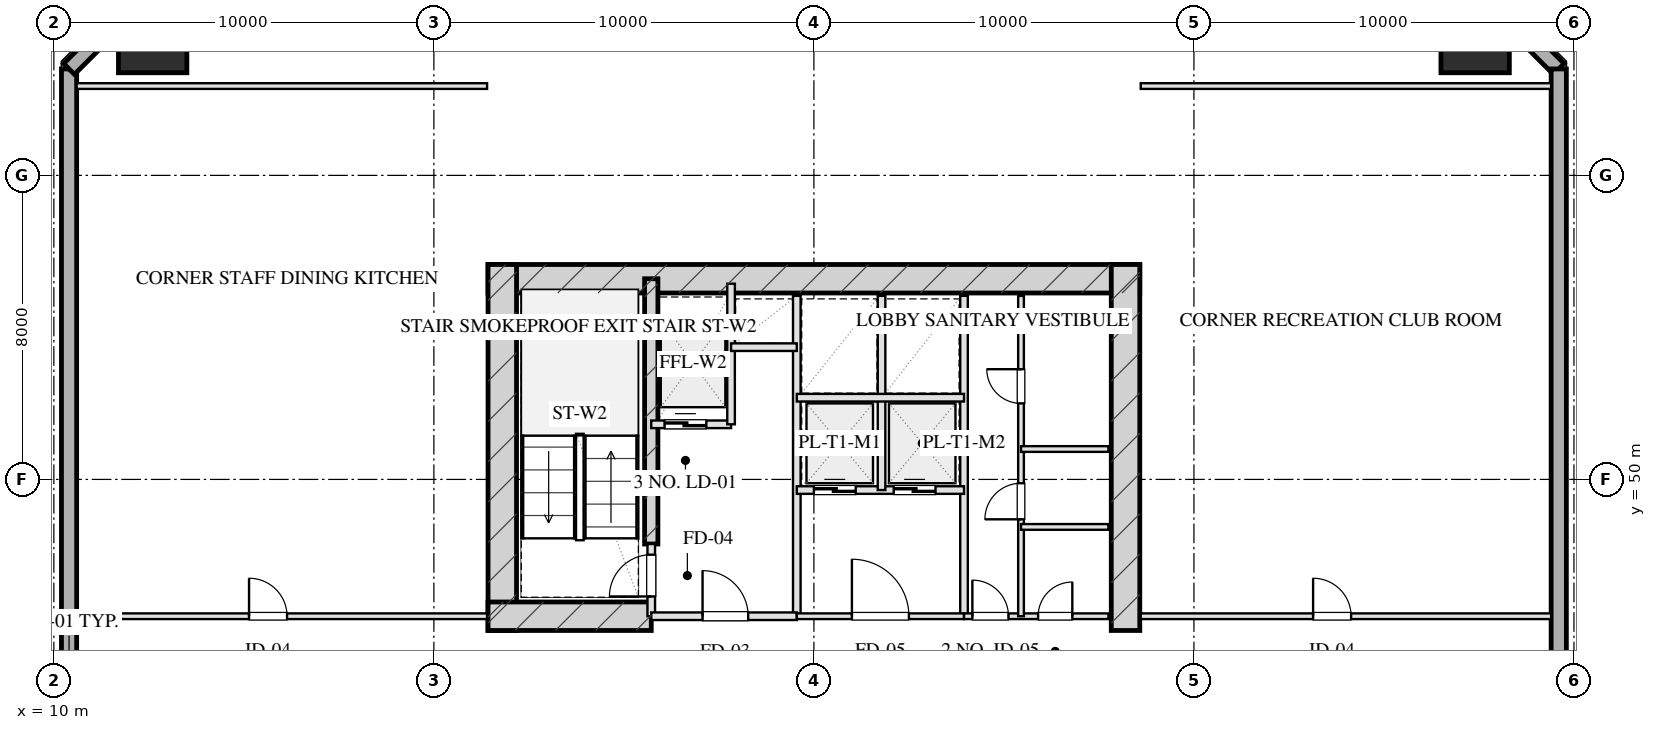
"""IFC4 building model, lengths in metres.
Left out: names, types, materials, properties, quantities, classifications, styles, units other than length and angle.
Written with IfcOpenShell. Run it as: python <this file> out.ifc"""

import sys

from ifc_helpers import new_model, si_unit, direction, frame, frame_2d, origin, origin_2d, place, context, subcontext, project, spatial, rectangle, hollow_rectangle, extrude, element, fill, save


model = new_model("IFC4")
c1 = context("Model", 3, precision=1e-05, world=origin(), true_north=direction((0.0, 1.0)))
c2 = subcontext(c1, "Body", "Model", "MODEL_VIEW")
j1 = project(units=[si_unit("LENGTHUNIT", "METRE"), si_unit("PLANEANGLEUNIT", "RADIAN")], contexts=[c1])
p1 = place(None, origin())
s1 = spatial("IfcSite", under=j1, at=p1, CompositionType="ELEMENT")
p2 = place(p1, origin())
s2 = spatial("IfcBuilding", under=s1, at=p2, CompositionType="ELEMENT")
p3 = place(p2, frame((0.0, 0.0, 67.85)))
s3 = spatial("IfcBuildingStorey", under=s2, at=p3, CompositionType="ELEMENT", Elevation=67.85)
p4 = place(p3, frame((21.425, 55.28, 0.0), z_axis=(0.0, 0.0, 1.0), x_axis=(1.0, 0.0, 0.0)))
e1 = element("IfcWall", 1, at=p4, inside=s3, PredefinedType="SHEAR", context=c2, shape_type="SweptSolid", body=[
    extrude(rectangle(XDim=17.15, YDim=0.75, at=frame_2d((8.575, 0.0))), origin(), (0.0, 0.0, 1.0), 3.45),
])
for number, where, z_axis, x_axis in (
    (2, (21.8, 46.025, 0.0), (0.0, 0.0, 1.0), (0.0, 1.0, 0.0)),
    (3, (38.2, 46.025, 0.0), (0.0, 0.0, 1.0), (0.0, 1.0, 0.0)),
):
    element("IfcWall", number, at=place(p3, frame(where, z_axis=z_axis, x_axis=x_axis)), inside=s3, PredefinedType="SHEAR", context=c2, shape_type="SweptSolid", body=[
        extrude(rectangle(XDim=9.63, YDim=0.75, at=frame_2d((4.815, 0.0))), origin(), (0.0, 0.0, 1.0), 3.45),
    ])
p5 = place(p3, frame((25.72, 48.3, 0.0), z_axis=(0.0, 0.0, 1.0), x_axis=(0.0, 1.0, 0.0)))
e4 = element("IfcWall", 4, at=p5, inside=s3, PredefinedType="SHEAR", context=c2, shape_type="SweptSolid", body=[
    extrude(rectangle(XDim=6.98, YDim=0.35, at=frame_2d((3.49, 0.0))), origin(), (0.0, 0.0, 1.0), 3.45),
])
p6 = place(p3, frame((21.425, 46.4, 0.0), z_axis=(0.0, 0.0, 1.0), x_axis=(1.0, 0.0, 0.0)))
e5 = element("IfcWall", 5, at=p6, inside=s3, PredefinedType="SHEAR", context=c2, shape_type="SweptSolid", body=[
    extrude(rectangle(XDim=4.295, YDim=0.75, at=frame_2d((2.147, 0.0))), origin(), (0.0, 0.0, 1.0), 3.45),
])
for number, where, z_axis, x_axis in (
    (6, (47.4, 61.6, 0.0), (0.0, 0.0, 1.0), (1.0, 0.0, 0.0)),
    (7, (12.6, 61.6, 0.0), (0.0, 0.0, 1.0), (1.0, 0.0, 0.0)),
):
    element("IfcColumn", number, at=place(p3, frame(where, z_axis=z_axis, x_axis=x_axis)), inside=s3, PredefinedType="COLUMN", context=c2, shape_type="SweptSolid", body=[
        extrude(hollow_rectangle(XDim=1.8, YDim=1.8, WallThickness=0.06, at=origin_2d()), origin(), (0.0, 0.0, 1.0), 3.451),
    ])
p7 = place(p3, frame((10.4, 7.2, 0.0), z_axis=(0.0, 0.0, 1.0), x_axis=(0.0, 1.0, 0.0)))
e8 = element("IfcWall", 8, at=p7, inside=s3, PredefinedType="SOLIDWALL", context=c2, shape_type="SweptSolid", body=[
    extrude(rectangle(XDim=53.6, YDim=0.4, at=frame_2d((26.8, 0.0))), origin(), (0.0, 0.0, 1.0), 2.61),
])
p8 = place(p7, frame((31.95, 0.0, 0.75)))
e9 = element("IfcOpeningElement", 9, at=p8, cuts=e8, PredefinedType="OPENING", context=c2, shape_type="SweptSolid", body=[
    extrude(rectangle(XDim=2.5, YDim=1.46, at=frame_2d((1.25, 0.73))), frame((0.0, 0.21, 0.0), z_axis=(0.0, -1.0, 0.0), x_axis=(1.0, 0.0, 0.0)), (0.0, 0.0, 1.0), 0.42),
])
p9 = place(p7, frame((20.45, 0.0, 0.0)))
e10 = element("IfcOpeningElement", 10, at=p9, cuts=e8, PredefinedType="OPENING", context=c2, shape_type="SweptSolid", body=[
    extrude(rectangle(XDim=1.1, YDim=2.15, at=frame_2d((0.55, 1.075))), frame((0.0, 0.21, 0.0), z_axis=(0.0, -1.0, 0.0), x_axis=(1.0, 0.0, 0.0)), (0.0, 0.0, 1.0), 0.42),
])
for number, where, z_axis, x_axis in (
    (11, (10.4, 60.8, 0.0), (0.0, 0.0, 1.0), (0.707, 0.707, 0.0)),
    (12, (46.6, 63.8, 0.0), (0.0, 0.0, 1.0), (0.707, -0.707, 0.0)),
):
    element("IfcWall", number, at=place(p3, frame(where, z_axis=z_axis, x_axis=x_axis)), inside=s3, PredefinedType="SOLIDWALL", context=c2, shape_type="SweptSolid", body=[
        extrude(rectangle(XDim=4.243, YDim=0.4, at=frame_2d((2.121, 0.0))), origin(), (0.0, 0.0, 1.0), 2.61),
    ])
p10 = place(p3, frame((49.6, 60.8, 0.0), z_axis=(0.0, 0.0, 1.0), x_axis=(0.0, -1.0, 0.0)))
e13 = element("IfcWall", 13, at=p10, inside=s3, PredefinedType="SOLIDWALL", context=c2, shape_type="SweptSolid", body=[
    extrude(rectangle(XDim=53.6, YDim=0.4, at=frame_2d((26.8, 0.0))), origin(), (0.0, 0.0, 1.0), 2.61),
])
p11 = place(p10, frame((22.95, 0.0, 0.75)))
e14 = element("IfcOpeningElement", 14, at=p11, cuts=e13, PredefinedType="OPENING", context=c2, shape_type="SweptSolid", body=[
    extrude(rectangle(XDim=2.5, YDim=1.46, at=frame_2d((1.25, 0.73))), frame((0.0, 0.21, 0.0), z_axis=(0.0, -1.0, 0.0), x_axis=(1.0, 0.0, 0.0)), (0.0, 0.0, 1.0), 0.42),
])
p12 = place(p10, frame((29.35, 0.0, 0.0)))
e15 = element("IfcOpeningElement", 15, at=p12, cuts=e13, PredefinedType="OPENING", context=c2, shape_type="SweptSolid", body=[
    extrude(rectangle(XDim=1.1, YDim=2.15, at=frame_2d((0.55, 1.075))), frame((0.0, 0.21, 0.0), z_axis=(0.0, -1.0, 0.0), x_axis=(1.0, 0.0, 0.0)), (0.0, 0.0, 1.0), 0.42),
])
p13 = place(p3, frame((25.72, 46.4, 0.0), z_axis=(0.0, 0.0, 1.0), x_axis=(0.0, 1.0, 0.0)))
e16 = element("IfcWall", 16, at=p13, inside=s3, PredefinedType="PARTITIONING", context=c2, shape_type="SweptSolid", body=[
    extrude(rectangle(XDim=1.9, YDim=0.2, at=frame_2d((0.95, 0.0))), origin(), (0.0, 0.0, 1.0), 3.175),
])
p14 = place(p13, frame((0.52, 0.0, 0.0)))
e17 = element("IfcOpeningElement", 17, at=p14, cuts=e16, PredefinedType="OPENING", context=c2, shape_type="SweptSolid", body=[
    extrude(rectangle(XDim=1.1, YDim=2.05, at=frame_2d((0.55, 1.025))), frame((0.0, 0.11, 0.0), z_axis=(0.0, -1.0, 0.0), x_axis=(1.0, 0.0, 0.0)), (0.0, 0.0, 1.0), 0.22),
])
p15 = place(p3, frame((29.55, 46.4, 0.0), z_axis=(0.0, 0.0, 1.0), x_axis=(0.0, 1.0, 0.0)))
e18 = element("IfcWall", 18, at=p15, inside=s3, PredefinedType="PARTITIONING", context=c2, shape_type="SweptSolid", body=[
    extrude(rectangle(XDim=8.43, YDim=0.2, at=frame_2d((4.215, 0.0))), origin(), (0.0, 0.0, 1.0), 3.175),
])
p16 = place(p3, frame((25.72, 46.4, 0.0), z_axis=(0.0, 0.0, 1.0), x_axis=(1.0, 0.0, 0.0)))
e19 = element("IfcWall", 19, at=p16, inside=s3, PredefinedType="PARTITIONING", context=c2, shape_type="SweptSolid", body=[
    extrude(rectangle(XDim=3.83, YDim=0.2, at=frame_2d((1.915, 0.0))), origin(), (0.0, 0.0, 1.0), 3.175),
])
p17 = place(p16, frame((1.35, 0.0, 0.0)))
e20 = element("IfcOpeningElement", 20, at=p17, cuts=e19, PredefinedType="OPENING", context=c2, shape_type="SweptSolid", body=[
    extrude(rectangle(XDim=1.2, YDim=2.05, at=frame_2d((0.6, 1.025))), frame((0.0, 0.11, 0.0), z_axis=(0.0, -1.0, 0.0), x_axis=(1.0, 0.0, 0.0)), (0.0, 0.0, 1.0), 0.22),
])
p18 = place(p3, frame((25.72, 51.45, 0.0), z_axis=(0.0, 0.0, 1.0), x_axis=(1.0, 0.0, 0.0)))
e21 = element("IfcWall", 21, at=p18, inside=s3, PredefinedType="PARTITIONING", context=c2, shape_type="SweptSolid", body=[
    extrude(rectangle(XDim=2.1, YDim=0.2, at=frame_2d((1.05, 0.0))), origin(), (0.0, 0.0, 1.0), 3.175),
])
p19 = place(p18, frame((0.35, 0.0, 0.0)))
e22 = element("IfcOpeningElement", 22, at=p19, cuts=e21, PredefinedType="OPENING", context=c2, shape_type="SweptSolid", body=[
    extrude(rectangle(XDim=1.1, YDim=2.05, at=frame_2d((0.55, 1.025))), frame((0.0, 0.11, 0.0), z_axis=(0.0, -1.0, 0.0), x_axis=(1.0, 0.0, 0.0)), (0.0, 0.0, 1.0), 0.22),
])
p20 = place(p3, frame((27.82, 51.45, 0.0), z_axis=(0.0, 0.0, 1.0), x_axis=(0.0, 1.0, 0.0)))
e23 = element("IfcWall", 23, at=p20, inside=s3, PredefinedType="PARTITIONING", context=c2, shape_type="SweptSolid", body=[
    extrude(rectangle(XDim=3.7, YDim=0.2, at=frame_2d((1.85, 0.0))), origin(), (0.0, 0.0, 1.0), 3.175),
])
p21 = place(p3, frame((27.82, 53.48, 0.0), z_axis=(0.0, 0.0, 1.0), x_axis=(1.0, 0.0, 0.0)))
e24 = element("IfcWall", 24, at=p21, inside=s3, PredefinedType="PARTITIONING", context=c2, shape_type="SweptSolid", body=[
    extrude(rectangle(XDim=1.73, YDim=0.2, at=frame_2d((0.865, 0.0))), origin(), (0.0, 0.0, 1.0), 3.175),
])
p22 = place(p3, frame((33.95, 46.4, 0.0), z_axis=(0.0, 0.0, 1.0), x_axis=(0.0, 1.0, 0.0)))
e25 = element("IfcWall", 25, at=p22, inside=s3, PredefinedType="PARTITIONING", context=c2, shape_type="SweptSolid", body=[
    extrude(rectangle(XDim=8.43, YDim=0.2, at=frame_2d((4.215, 0.0))), origin(), (0.0, 0.0, 1.0), 3.175),
])
p23 = place(p3, frame((29.55, 46.4, 0.0), z_axis=(0.0, 0.0, 1.0), x_axis=(1.0, 0.0, 0.0)))
e26 = element("IfcWall", 26, at=p23, inside=s3, PredefinedType="PARTITIONING", context=c2, shape_type="SweptSolid", body=[
    extrude(rectangle(XDim=4.4, YDim=0.15, at=frame_2d((2.2, 0.0))), origin(), (0.0, 0.0, 1.0), 3.175),
])
p24 = place(p23, frame((1.45, 0.0, 0.0)))
e27 = element("IfcOpeningElement", 27, at=p24, cuts=e26, PredefinedType="OPENING", context=c2, shape_type="SweptSolid", body=[
    extrude(rectangle(XDim=1.5, YDim=2.05, at=frame_2d((0.75, 1.025))), frame((0.0, 0.085, 0.0), z_axis=(0.0, -1.0, 0.0), x_axis=(1.0, 0.0, 0.0)), (0.0, 0.0, 1.0), 0.17),
])
p25 = place(p3, frame((29.55, 49.72, 0.0), z_axis=(0.0, 0.0, 1.0), x_axis=(1.0, 0.0, 0.0)))
e28 = element("IfcWall", 28, at=p25, inside=s3, PredefinedType="PARTITIONING", context=c2, shape_type="SweptSolid", body=[
    extrude(rectangle(XDim=4.4, YDim=0.2, at=frame_2d((2.2, 0.0))), origin(), (0.0, 0.0, 1.0), 3.175),
])
p26 = place(p25, frame((0.45, 0.0, 0.0)))
e29 = element("IfcOpeningElement", 29, at=p26, cuts=e28, PredefinedType="OPENING", context=c2, shape_type="SweptSolid", body=[
    extrude(rectangle(XDim=1.1, YDim=2.05, at=frame_2d((0.55, 1.025))), frame((0.0, 0.11, 0.0), z_axis=(0.0, -1.0, 0.0), x_axis=(1.0, 0.0, 0.0)), (0.0, 0.0, 1.0), 0.22),
])
p27 = place(p25, frame((2.55, 0.0, 0.0)))
e30 = element("IfcOpeningElement", 30, at=p27, cuts=e28, PredefinedType="OPENING", context=c2, shape_type="SweptSolid", body=[
    extrude(rectangle(XDim=1.1, YDim=2.05, at=frame_2d((0.55, 1.025))), frame((0.0, 0.11, 0.0), z_axis=(0.0, -1.0, 0.0), x_axis=(1.0, 0.0, 0.0)), (0.0, 0.0, 1.0), 0.22),
])
p28 = place(p3, frame((31.78, 49.72, 0.0), z_axis=(0.0, 0.0, 1.0), x_axis=(0.0, 1.0, 0.0)))
e31 = element("IfcWall", 31, at=p28, inside=s3, PredefinedType="PARTITIONING", context=c2, shape_type="SweptSolid", body=[
    extrude(rectangle(XDim=5.11, YDim=0.2, at=frame_2d((2.555, 0.0))), origin(), (0.0, 0.0, 1.0), 3.175),
])
p29 = place(p3, frame((29.55, 52.15, 0.0), z_axis=(0.0, 0.0, 1.0), x_axis=(1.0, 0.0, 0.0)))
e32 = element("IfcWall", 32, at=p29, inside=s3, PredefinedType="PARTITIONING", context=c2, shape_type="SweptSolid", body=[
    extrude(rectangle(XDim=4.4, YDim=0.2, at=frame_2d((2.2, 0.0))), origin(), (0.0, 0.0, 1.0), 3.175),
])
p30 = place(p3, frame((33.95, 46.4, 0.0), z_axis=(0.0, 0.0, 1.0), x_axis=(1.0, 0.0, 0.0)))
e33 = element("IfcWall", 33, at=p30, inside=s3, PredefinedType="PARTITIONING", context=c2, shape_type="SweptSolid", body=[
    extrude(rectangle(XDim=3.8, YDim=0.15, at=frame_2d((1.9, 0.0))), origin(), (0.0, 0.0, 1.0), 3.175),
])
p31 = place(p30, frame((0.22, 0.0, 0.0)))
e34 = element("IfcOpeningElement", 34, at=p31, cuts=e33, PredefinedType="OPENING", context=c2, shape_type="SweptSolid", body=[
    extrude(rectangle(XDim=0.95, YDim=2.05, at=frame_2d((0.475, 1.025))), frame((0.0, 0.085, 0.0), z_axis=(0.0, -1.0, 0.0), x_axis=(1.0, 0.0, 0.0)), (0.0, 0.0, 1.0), 0.17),
])
p32 = place(p30, frame((1.95, 0.0, 0.0)))
e35 = element("IfcOpeningElement", 35, at=p32, cuts=e33, PredefinedType="OPENING", context=c2, shape_type="SweptSolid", body=[
    extrude(rectangle(XDim=0.9, YDim=2.05, at=frame_2d((0.45, 1.025))), frame((0.0, 0.085, 0.0), z_axis=(0.0, -1.0, 0.0), x_axis=(1.0, 0.0, 0.0)), (0.0, 0.0, 1.0), 0.17),
])
p33 = place(p3, frame((35.45, 46.4, 0.0), z_axis=(0.0, 0.0, 1.0), x_axis=(0.0, 1.0, 0.0)))
e36 = element("IfcWall", 36, at=p33, inside=s3, PredefinedType="PARTITIONING", context=c2, shape_type="SweptSolid", body=[
    extrude(rectangle(XDim=8.43, YDim=0.15, at=frame_2d((4.215, 0.0))), origin(), (0.0, 0.0, 1.0), 2.765),
])
p34 = place(p33, frame((2.55, 0.0, 0.0)))
e37 = element("IfcOpeningElement", 37, at=p34, cuts=e36, PredefinedType="OPENING", context=c2, shape_type="SweptSolid", body=[
    extrude(rectangle(XDim=0.95, YDim=2.05, at=frame_2d((0.475, 1.025))), frame((0.0, 0.085, 0.0), z_axis=(0.0, -1.0, 0.0), x_axis=(1.0, 0.0, 0.0)), (0.0, 0.0, 1.0), 0.17),
])
p35 = place(p33, frame((5.6, 0.0, 0.0)))
e38 = element("IfcOpeningElement", 38, at=p35, cuts=e36, PredefinedType="OPENING", context=c2, shape_type="SweptSolid", body=[
    extrude(rectangle(XDim=0.9, YDim=2.05, at=frame_2d((0.45, 1.025))), frame((0.0, 0.085, 0.0), z_axis=(0.0, -1.0, 0.0), x_axis=(1.0, 0.0, 0.0)), (0.0, 0.0, 1.0), 0.17),
])
for number, where, z_axis, x_axis in (
    (39, (35.45, 50.8, 0.0), (0.0, 0.0, 1.0), (1.0, 0.0, 0.0)),
    (40, (35.45, 48.75, 0.0), (0.0, 0.0, 1.0), (1.0, 0.0, 0.0)),
):
    element("IfcWall", number, at=place(p3, frame(where, z_axis=z_axis, x_axis=x_axis)), inside=s3, PredefinedType="PARTITIONING", context=c2, shape_type="SweptSolid", body=[
        extrude(rectangle(XDim=2.3, YDim=0.15, at=frame_2d((1.15, 0.0))), origin(), (0.0, 0.0, 1.0), 3.175),
    ])
p36 = place(p3, frame((10.6, 60.35, 0.0), z_axis=(0.0, 0.0, 1.0), x_axis=(1.0, 0.0, 0.0)))
e41 = element("IfcWall", 41, at=p36, inside=s3, PredefinedType="PARTITIONING", context=c2, shape_type="SweptSolid", body=[
    extrude(rectangle(XDim=10.8, YDim=0.15, at=frame_2d((5.4, 0.0))), origin(), (0.0, 0.0, 1.0), 3.175),
])
p37 = place(p3, frame((10.6, 46.4, 0.0), z_axis=(0.0, 0.0, 1.0), x_axis=(1.0, 0.0, 0.0)))
e42 = element("IfcWall", 42, at=p37, inside=s3, PredefinedType="PARTITIONING", context=c2, shape_type="SweptSolid", body=[
    extrude(rectangle(XDim=10.8, YDim=0.15, at=frame_2d((5.4, 0.0))), origin(), (0.0, 0.0, 1.0), 3.175),
])
p38 = place(p37, frame((4.536, 0.0, 0.0)))
e43 = element("IfcOpeningElement", 43, at=p38, cuts=e42, PredefinedType="OPENING", context=c2, shape_type="SweptSolid", body=[
    extrude(rectangle(XDim=1.0, YDim=2.05, at=frame_2d((0.5, 1.025))), frame((0.0, 0.085, 0.0), z_axis=(0.0, -1.0, 0.0), x_axis=(1.0, 0.0, 0.0)), (0.0, 0.0, 1.0), 0.17),
])
p39 = place(p3, frame((38.6, 60.35, 0.0), z_axis=(0.0, 0.0, 1.0), x_axis=(1.0, 0.0, 0.0)))
e44 = element("IfcWall", 44, at=p39, inside=s3, PredefinedType="PARTITIONING", context=c2, shape_type="SweptSolid", body=[
    extrude(rectangle(XDim=10.8, YDim=0.15, at=frame_2d((5.4, 0.0))), origin(), (0.0, 0.0, 1.0), 3.175),
])
p40 = place(p3, frame((38.6, 46.4, 0.0), z_axis=(0.0, 0.0, 1.0), x_axis=(1.0, 0.0, 0.0)))
e45 = element("IfcWall", 45, at=p40, inside=s3, PredefinedType="PARTITIONING", context=c2, shape_type="SweptSolid", body=[
    extrude(rectangle(XDim=10.8, YDim=0.15, at=frame_2d((5.4, 0.0))), origin(), (0.0, 0.0, 1.0), 3.175),
])
p41 = place(p40, frame((4.536, 0.0, 0.0)))
e46 = element("IfcOpeningElement", 46, at=p41, cuts=e45, PredefinedType="OPENING", context=c2, shape_type="SweptSolid", body=[
    extrude(rectangle(XDim=1.0, YDim=2.05, at=frame_2d((0.5, 1.025))), frame((0.0, 0.085, 0.0), z_axis=(0.0, -1.0, 0.0), x_axis=(1.0, 0.0, 0.0)), (0.0, 0.0, 1.0), 0.17),
])
p42 = place(p14, origin())
e47 = element("IfcDoor", 47, at=p42, inside=s3, OperationType="SINGLE_SWING_LEFT", PredefinedType="DOOR", context=c2, shape_type="SweptSolid", body=[
    extrude(rectangle(XDim=1.1, YDim=2.05, at=frame_2d((0.55, 1.025))), frame((0.0, 0.025, 0.0), z_axis=(0.0, -1.0, 0.0), x_axis=(1.0, 0.0, 0.0)), (0.0, 0.0, 1.0), 0.05),
])
fill(e17, e47)
p43 = place(p17, origin())
e48 = element("IfcDoor", 48, at=p43, inside=s3, OperationType="SINGLE_SWING_LEFT", PredefinedType="DOOR", context=c2, shape_type="SweptSolid", body=[
    extrude(rectangle(XDim=1.2, YDim=2.05, at=frame_2d((0.6, 1.025))), frame((0.0, 0.025, 0.0), z_axis=(0.0, -1.0, 0.0), x_axis=(1.0, 0.0, 0.0)), (0.0, 0.0, 1.0), 0.05),
])
fill(e20, e48)
p44 = place(p19, origin())
e49 = element("IfcDoor", 49, at=p44, inside=s3, OperationType="DOUBLE_DOOR_SLIDING", PredefinedType="DOOR", context=c2, shape_type="SweptSolid", body=[
    extrude(rectangle(XDim=1.1, YDim=2.05, at=frame_2d((0.55, 1.025))), frame((0.0, 0.025, 0.0), z_axis=(0.0, -1.0, 0.0), x_axis=(1.0, 0.0, 0.0)), (0.0, 0.0, 1.0), 0.05),
])
fill(e22, e49)
p45 = place(p24, origin())
e50 = element("IfcDoor", 50, at=p45, inside=s3, OperationType="SINGLE_SWING_LEFT", PredefinedType="DOOR", context=c2, shape_type="SweptSolid", body=[
    extrude(rectangle(XDim=1.5, YDim=2.05, at=frame_2d((0.75, 1.025))), frame((0.0, 0.025, 0.0), z_axis=(0.0, -1.0, 0.0), x_axis=(1.0, 0.0, 0.0)), (0.0, 0.0, 1.0), 0.05),
])
fill(e27, e50)
p46 = place(p26, origin())
e51 = element("IfcDoor", 51, at=p46, inside=s3, OperationType="DOUBLE_DOOR_SLIDING", PredefinedType="DOOR", context=c2, shape_type="SweptSolid", body=[
    extrude(rectangle(XDim=1.1, YDim=2.05, at=frame_2d((0.55, 1.025))), frame((0.0, 0.025, 0.0), z_axis=(0.0, -1.0, 0.0), x_axis=(1.0, 0.0, 0.0)), (0.0, 0.0, 1.0), 0.05),
])
fill(e29, e51)
p47 = place(p27, origin())
e52 = element("IfcDoor", 52, at=p47, inside=s3, OperationType="DOUBLE_DOOR_SLIDING", PredefinedType="DOOR", context=c2, shape_type="SweptSolid", body=[
    extrude(rectangle(XDim=1.1, YDim=2.05, at=frame_2d((0.55, 1.025))), frame((0.0, 0.025, 0.0), z_axis=(0.0, -1.0, 0.0), x_axis=(1.0, 0.0, 0.0)), (0.0, 0.0, 1.0), 0.05),
])
fill(e30, e52)
p48 = place(p31, origin())
e53 = element("IfcDoor", 53, at=p48, inside=s3, OperationType="SINGLE_SWING_LEFT", PredefinedType="DOOR", context=c2, shape_type="SweptSolid", body=[
    extrude(rectangle(XDim=0.95, YDim=2.05, at=frame_2d((0.475, 1.025))), frame((0.0, 0.025, 0.0), z_axis=(0.0, -1.0, 0.0), x_axis=(1.0, 0.0, 0.0)), (0.0, 0.0, 1.0), 0.05),
])
fill(e34, e53)
p49 = place(p32, origin())
e54 = element("IfcDoor", 54, at=p49, inside=s3, OperationType="SINGLE_SWING_RIGHT", PredefinedType="DOOR", context=c2, shape_type="SweptSolid", body=[
    extrude(rectangle(XDim=0.9, YDim=2.05, at=frame_2d((0.45, 1.025))), frame((0.0, 0.025, 0.0), z_axis=(0.0, -1.0, 0.0), x_axis=(1.0, 0.0, 0.0)), (0.0, 0.0, 1.0), 0.05),
])
fill(e35, e54)
p50 = place(p34, origin())
e55 = element("IfcDoor", 55, at=p50, inside=s3, OperationType="SINGLE_SWING_LEFT", PredefinedType="DOOR", context=c2, shape_type="SweptSolid", body=[
    extrude(rectangle(XDim=0.95, YDim=2.05, at=frame_2d((0.475, 1.025))), frame((0.0, 0.025, 0.0), z_axis=(0.0, -1.0, 0.0), x_axis=(1.0, 0.0, 0.0)), (0.0, 0.0, 1.0), 0.05),
])
fill(e37, e55)
p51 = place(p35, origin())
e56 = element("IfcDoor", 56, at=p51, inside=s3, OperationType="SINGLE_SWING_RIGHT", PredefinedType="DOOR", context=c2, shape_type="SweptSolid", body=[
    extrude(rectangle(XDim=0.9, YDim=2.05, at=frame_2d((0.45, 1.025))), frame((0.0, 0.025, 0.0), z_axis=(0.0, -1.0, 0.0), x_axis=(1.0, 0.0, 0.0)), (0.0, 0.0, 1.0), 0.05),
])
fill(e38, e56)
p52 = place(p38, origin())
e57 = element("IfcDoor", 57, at=p52, inside=s3, OperationType="SINGLE_SWING_LEFT", PredefinedType="DOOR", context=c2, shape_type="SweptSolid", body=[
    extrude(rectangle(XDim=1.0, YDim=2.05, at=frame_2d((0.5, 1.025))), frame((0.0, 0.025, 0.0), z_axis=(0.0, -1.0, 0.0), x_axis=(1.0, 0.0, 0.0)), (0.0, 0.0, 1.0), 0.05),
])
fill(e43, e57)
p53 = place(p41, origin())
e58 = element("IfcDoor", 58, at=p53, inside=s3, OperationType="SINGLE_SWING_LEFT", PredefinedType="DOOR", context=c2, shape_type="SweptSolid", body=[
    extrude(rectangle(XDim=1.0, YDim=2.05, at=frame_2d((0.5, 1.025))), frame((0.0, 0.025, 0.0), z_axis=(0.0, -1.0, 0.0), x_axis=(1.0, 0.0, 0.0)), (0.0, 0.0, 1.0), 0.05),
])
fill(e46, e58)
save(model, sys.argv[1])
